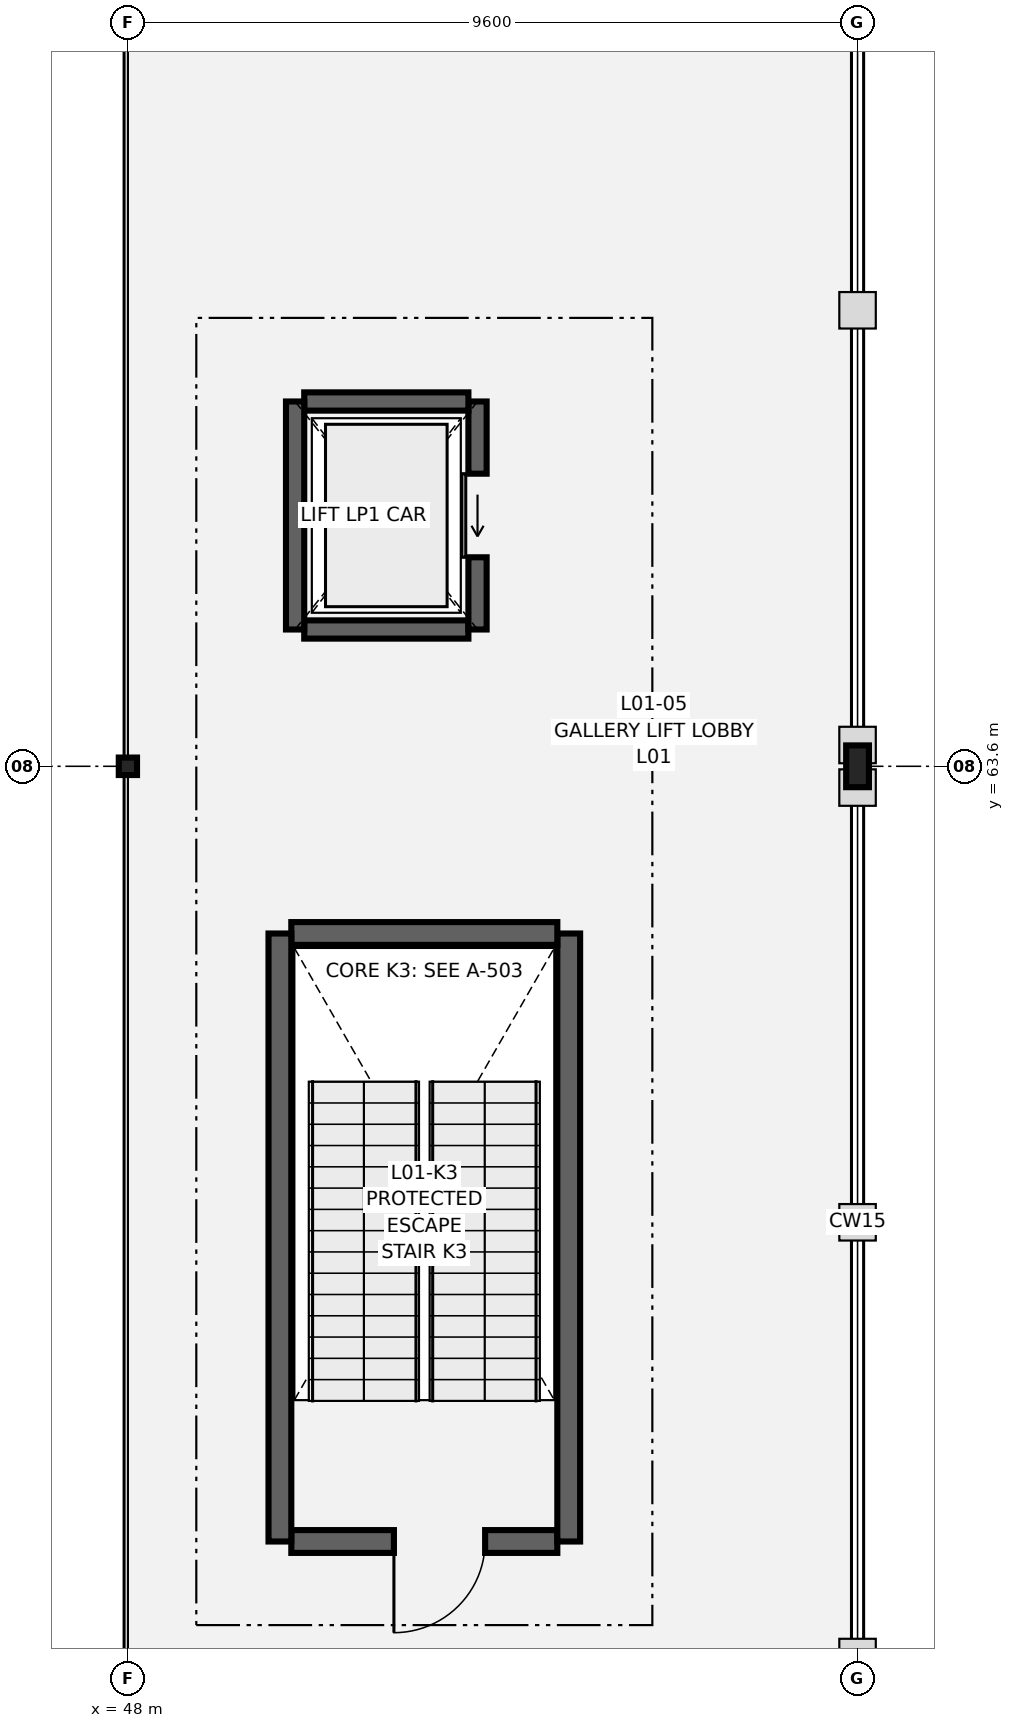
"""IFC4 building model, lengths in metres.
Left out: names, types, materials, properties, quantities, classifications, styles, units other than length and angle.
Written with IfcOpenShell. Run it as: python <this file> out.ifc"""

import sys

from ifc_helpers import new_model, si_unit, direction, frame, frame_2d, origin, origin_2d, place, context, subcontext, project, spatial, rectangle, i_section, extrude, element, fill, save


model = new_model("IFC4")
c1 = context("Model", 3, precision=1e-05, world=origin(), true_north=direction((0.0, 1.0)))
c2 = subcontext(c1, "Body", "Model", "MODEL_VIEW")
j1 = project(units=[si_unit("LENGTHUNIT", "METRE"), si_unit("PLANEANGLEUNIT", "RADIAN")], contexts=[c1])
p1 = place(None, origin())
s1 = spatial("IfcSite", under=j1, at=p1, CompositionType="ELEMENT")
p2 = place(p1, origin())
s2 = spatial("IfcBuilding", under=s1, at=p2, CompositionType="ELEMENT")
p3 = place(p2, frame((0.0, 0.0, 5.4)))
s3 = spatial("IfcBuildingStorey", under=s2, at=p3, CompositionType="ELEMENT", Elevation=5.4)
p4 = place(p3, frame((48.0, 63.6, 0.0), z_axis=(0.0, 0.0, 1.0), x_axis=(1.0, 0.0, 0.0)))
e1 = element("IfcColumn", 1, at=p4, inside=s3, PredefinedType="COLUMN", context=c2, shape_type="SweptSolid", body=[
    extrude(i_section(OverallWidth=0.24, OverallDepth=0.23, WebThickness=0.008, FlangeThickness=0.012, FilletRadius=0.021, at=origin_2d()), origin(), (0.0, 0.0, 1.0), 4.8),
])
p5 = place(p3, frame((57.6, 63.6, 0.0), z_axis=(0.0, 0.0, 1.0), x_axis=(1.0, 0.0, 0.0)))
e2 = element("IfcColumn", 2, at=p5, inside=s3, PredefinedType="COLUMN", context=c2, shape_type="SweptSolid", body=[
    extrude(i_section(OverallWidth=0.3, OverallDepth=0.55, WebThickness=0.015, FlangeThickness=0.029, FilletRadius=0.027, at=origin_2d()), origin(), (0.0, 0.0, 1.0), 4.8),
])
p6 = place(p3, frame((53.65, 53.4, 0.0), z_axis=(0.0, 0.0, 1.0), x_axis=(-1.0, 0.0, 0.0)))
e3 = element("IfcWall", 3, at=p6, inside=s3, PredefinedType="SHEAR", context=c2, shape_type="SweptSolid", body=[
    extrude(rectangle(XDim=3.5, YDim=0.3, at=frame_2d((1.75, 0.0))), origin(), (0.0, 0.0, 1.0), 4.49),
])
p7 = place(p6, frame((0.95, 0.0, 0.0)))
e4 = element("IfcOpeningElement", 4, at=p7, cuts=e3, PredefinedType="OPENING", context=c2, shape_type="SweptSolid", body=[
    extrude(rectangle(XDim=1.2, YDim=2.2, at=frame_2d((0.6, 1.1))), frame((0.0, 0.16, 0.0), z_axis=(0.0, -1.0, 0.0), x_axis=(1.0, 0.0, 0.0)), (0.0, 0.0, 1.0), 0.32),
])
p8 = place(p3, frame((53.8, 53.4, 0.0), z_axis=(0.0, 0.0, 1.0), x_axis=(0.0, 1.0, 0.0)))
e5 = element("IfcWall", 5, at=p8, inside=s3, PredefinedType="SHEAR", context=c2, shape_type="SweptSolid", body=[
    extrude(rectangle(XDim=8.0, YDim=0.3, at=frame_2d((4.0, 0.0))), origin(), (0.0, 0.0, 1.0), 4.49),
])
p9 = place(p3, frame((53.65, 61.4, 0.0), z_axis=(0.0, 0.0, 1.0), x_axis=(-1.0, 0.0, 0.0)))
e6 = element("IfcWall", 6, at=p9, inside=s3, PredefinedType="SHEAR", context=c2, shape_type="SweptSolid", body=[
    extrude(rectangle(XDim=3.5, YDim=0.3, at=frame_2d((1.75, 0.0))), origin(), (0.0, 0.0, 1.0), 4.49),
])
p10 = place(p3, frame((50.0, 61.4, 0.0), z_axis=(0.0, 0.0, 1.0), x_axis=(0.0, -1.0, 0.0)))
e7 = element("IfcWall", 7, at=p10, inside=s3, PredefinedType="SHEAR", context=c2, shape_type="SweptSolid", body=[
    extrude(rectangle(XDim=8.0, YDim=0.3, at=frame_2d((4.0, 0.0))), origin(), (0.0, 0.0, 1.0), 4.49),
])
p11 = place(p3, frame((50.32, 65.4, 0.0), z_axis=(0.0, 0.0, 1.0), x_axis=(1.0, 0.0, 0.0)))
e8 = element("IfcWall", 8, at=p11, inside=s3, PredefinedType="SHEAR", context=c2, shape_type="SweptSolid", body=[
    extrude(rectangle(XDim=2.16, YDim=0.24, at=frame_2d((1.08, 0.0))), origin(), (0.0, 0.0, 1.0), 4.49),
])
p12 = place(p3, frame((52.6, 65.4, 0.0), z_axis=(0.0, 0.0, 1.0), x_axis=(0.0, 1.0, 0.0)))
e9 = element("IfcWall", 9, at=p12, inside=s3, PredefinedType="SHEAR", context=c2, shape_type="SweptSolid", body=[
    extrude(rectangle(XDim=3.0, YDim=0.24, at=frame_2d((1.5, 0.0))), origin(), (0.0, 0.0, 1.0), 4.49),
])
p13 = place(p12, frame((0.95, 0.0, 0.0)))
e10 = element("IfcOpeningElement", 10, at=p13, cuts=e9, PredefinedType="OPENING", context=c2, shape_type="SweptSolid", body=[
    extrude(rectangle(XDim=1.1, YDim=2.1, at=frame_2d((0.55, 1.05))), frame((0.0, 0.13, 0.0), z_axis=(0.0, -1.0, 0.0), x_axis=(1.0, 0.0, 0.0)), (0.0, 0.0, 1.0), 0.26),
])
p14 = place(p3, frame((52.48, 68.4, 0.0), z_axis=(0.0, 0.0, 1.0), x_axis=(-1.0, 0.0, 0.0)))
e11 = element("IfcWall", 11, at=p14, inside=s3, PredefinedType="SHEAR", context=c2, shape_type="SweptSolid", body=[
    extrude(rectangle(XDim=2.16, YDim=0.24, at=frame_2d((1.08, 0.0))), origin(), (0.0, 0.0, 1.0), 4.49),
])
p15 = place(p3, frame((50.2, 68.4, 0.0), z_axis=(0.0, 0.0, 1.0), x_axis=(0.0, -1.0, 0.0)))
e12 = element("IfcWall", 12, at=p15, inside=s3, PredefinedType="SHEAR", context=c2, shape_type="SweptSolid", body=[
    extrude(rectangle(XDim=3.0, YDim=0.24, at=frame_2d((1.5, 0.0))), origin(), (0.0, 0.0, 1.0), 4.49),
])
p16 = place(p7, origin())
e13 = element("IfcDoor", 13, at=p16, inside=s3, OperationType="SINGLE_SWING_RIGHT", PredefinedType="DOOR", context=c2, shape_type="SweptSolid", body=[
    extrude(rectangle(XDim=1.2, YDim=2.2, at=frame_2d((0.6, 1.1))), frame((0.0, 0.025, 0.0), z_axis=(0.0, -1.0, 0.0), x_axis=(1.0, 0.0, 0.0)), (0.0, 0.0, 1.0), 0.05),
])
fill(e4, e13)
p17 = place(p13, origin())
e14 = element("IfcDoor", 14, at=p17, inside=s3, OperationType="SLIDING_TO_LEFT", PredefinedType="DOOR", context=c2, shape_type="SweptSolid", body=[
    extrude(rectangle(XDim=1.1, YDim=2.1, at=frame_2d((0.55, 1.05))), frame((0.0, 0.025, 0.0), z_axis=(0.0, -1.0, 0.0), x_axis=(1.0, 0.0, 0.0)), (0.0, 0.0, 1.0), 0.05),
])
fill(e10, e14)
save(model, sys.argv[1])
